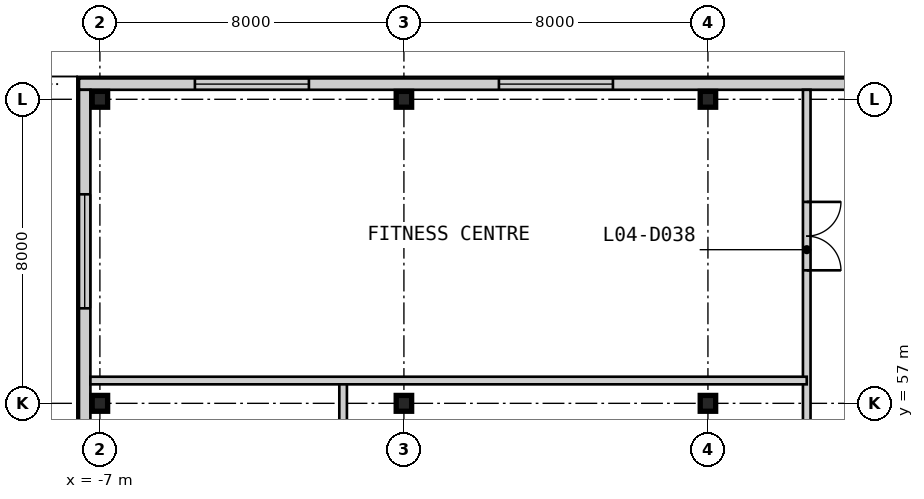
"""IFC4 building model, lengths in metres.
Left out: names, types, materials, properties, quantities, classifications, styles, units other than length and angle.
Written with IfcOpenShell. Run it as: python <this file> out.ifc"""

import sys

from ifc_helpers import new_model, si_unit, direction, frame, frame_2d, origin, origin_2d, place, context, subcontext, project, spatial, rectangle, i_section, extrude, element, fill, save


model = new_model("IFC4")
c1 = context("Model", 3, precision=1e-05, world=origin(), true_north=direction((0.0, 1.0)))
c2 = subcontext(c1, "Body", "Model", "MODEL_VIEW")
j1 = project(units=[si_unit("LENGTHUNIT", "METRE"), si_unit("PLANEANGLEUNIT", "RADIAN")], contexts=[c1])
p1 = place(None, origin())
s1 = spatial("IfcSite", under=j1, at=p1, CompositionType="ELEMENT")
p2 = place(p1, origin())
s2 = spatial("IfcBuilding", under=s1, at=p2, CompositionType="ELEMENT")
p3 = place(p2, frame((0.0, 0.0, 21.4)))
s3 = spatial("IfcBuildingStorey", under=s2, at=p3, CompositionType="ELEMENT", Elevation=21.4)
for number, where, z_axis, x_axis in (
    (1, (-7.0, 57.0, 0.0), (0.0, 0.0, 1.0), (1.0, 0.0, 0.0)),
    (2, (-7.0, 65.0, 0.0), (0.0, 0.0, 1.0), (1.0, 0.0, 0.0)),
    (3, (1.0, 57.0, 0.0), (0.0, 0.0, 1.0), (1.0, 0.0, 0.0)),
    (4, (1.0, 65.0, 0.0), (0.0, 0.0, 1.0), (1.0, 0.0, 0.0)),
    (5, (9.0, 57.0, 0.0), (0.0, 0.0, 1.0), (1.0, 0.0, 0.0)),
    (6, (9.0, 65.0, 0.0), (0.0, 0.0, 1.0), (1.0, 0.0, 0.0)),
):
    element("IfcColumn", number, at=place(p3, frame(where, z_axis=z_axis, x_axis=x_axis)), inside=s3, PredefinedType="COLUMN", context=c2, shape_type="SweptSolid", body=[
        extrude(i_section(OverallWidth=0.406, OverallDepth=0.417, WebThickness=0.03, FlangeThickness=0.048, at=origin_2d()), origin(), (0.0, 0.0, 1.0), 4.8),
    ])
p4 = place(p3, frame((57.55, 65.4, 0.0), z_axis=(0.0, 0.0, 1.0), x_axis=(-1.0, 0.0, 0.0)))
e7 = element("IfcWall", 7, at=p4, inside=s3, PredefinedType="SOLIDWALL", context=c2, shape_type="SweptSolid", body=[
    extrude(rectangle(XDim=65.1, YDim=0.3, at=frame_2d((32.55, 0.0))), origin(), (0.0, 0.0, 1.0), 4.5),
])
p5 = place(p4, frame((59.05, 0.0, 0.9)))
e8 = element("IfcOpeningElement", 8, at=p5, cuts=e7, PredefinedType="OPENING", context=c2, shape_type="SweptSolid", body=[
    extrude(rectangle(XDim=3.0, YDim=2.4, at=frame_2d((1.5, 1.2))), frame((0.0, 0.16, 0.0), z_axis=(0.0, -1.0, 0.0), x_axis=(1.0, 0.0, 0.0)), (0.0, 0.0, 1.0), 0.32),
])
p6 = place(p4, frame((51.05, 0.0, 0.9)))
e9 = element("IfcOpeningElement", 9, at=p6, cuts=e7, PredefinedType="OPENING", context=c2, shape_type="SweptSolid", body=[
    extrude(rectangle(XDim=3.0, YDim=2.4, at=frame_2d((1.5, 1.2))), frame((0.0, 0.16, 0.0), z_axis=(0.0, -1.0, 0.0), x_axis=(1.0, 0.0, 0.0)), (0.0, 0.0, 1.0), 0.32),
])
p7 = place(p4, frame((37.05, 0.0, 0.9)))
e10 = element("IfcOpeningElement", 10, at=p7, cuts=e7, PredefinedType="OPENING", context=c2, shape_type="SweptSolid", body=[
    extrude(rectangle(XDim=3.0, YDim=2.4, at=frame_2d((1.5, 1.2))), frame((0.0, 0.16, 0.0), z_axis=(0.0, -1.0, 0.0), x_axis=(1.0, 0.0, 0.0)), (0.0, 0.0, 1.0), 0.32),
])
p8 = place(p4, frame((25.05, 0.0, 0.9)))
e11 = element("IfcOpeningElement", 11, at=p8, cuts=e7, PredefinedType="OPENING", context=c2, shape_type="SweptSolid", body=[
    extrude(rectangle(XDim=3.0, YDim=2.4, at=frame_2d((1.5, 1.2))), frame((0.0, 0.16, 0.0), z_axis=(0.0, -1.0, 0.0), x_axis=(1.0, 0.0, 0.0)), (0.0, 0.0, 1.0), 0.32),
])
p9 = place(p4, frame((16.55, 0.0, 0.9)))
e12 = element("IfcOpeningElement", 12, at=p9, cuts=e7, PredefinedType="OPENING", context=c2, shape_type="SweptSolid", body=[
    extrude(rectangle(XDim=3.0, YDim=2.4, at=frame_2d((1.5, 1.2))), frame((0.0, 0.16, 0.0), z_axis=(0.0, -1.0, 0.0), x_axis=(1.0, 0.0, 0.0)), (0.0, 0.0, 1.0), 0.32),
])
p10 = place(p4, frame((10.55, 0.0, 0.9)))
e13 = element("IfcOpeningElement", 13, at=p10, cuts=e7, PredefinedType="OPENING", context=c2, shape_type="SweptSolid", body=[
    extrude(rectangle(XDim=3.0, YDim=2.4, at=frame_2d((1.5, 1.2))), frame((0.0, 0.16, 0.0), z_axis=(0.0, -1.0, 0.0), x_axis=(1.0, 0.0, 0.0)), (0.0, 0.0, 1.0), 0.32),
])
p11 = place(p4, frame((3.05, 0.0, 0.9)))
e14 = element("IfcOpeningElement", 14, at=p11, cuts=e7, PredefinedType="OPENING", context=c2, shape_type="SweptSolid", body=[
    extrude(rectangle(XDim=3.0, YDim=2.4, at=frame_2d((1.5, 1.2))), frame((0.0, 0.16, 0.0), z_axis=(0.0, -1.0, 0.0), x_axis=(1.0, 0.0, 0.0)), (0.0, 0.0, 1.0), 0.32),
])
p12 = place(p3, frame((-7.4, 65.25, 0.0), z_axis=(0.0, 0.0, 1.0), x_axis=(0.0, -1.0, 0.0)))
e15 = element("IfcWall", 15, at=p12, inside=s3, PredefinedType="SOLIDWALL", context=c2, shape_type="SweptSolid", body=[
    extrude(rectangle(XDim=72.5, YDim=0.3, at=frame_2d((36.25, 0.0))), origin(), (0.0, 0.0, 1.0), 4.5),
])
p13 = place(p12, frame((24.85, 0.0, 0.0)))
e16 = element("IfcOpeningElement", 16, at=p13, cuts=e15, PredefinedType="OPENING", context=c2, shape_type="SweptSolid", body=[
    extrude(rectangle(XDim=1.8, YDim=2.4, at=frame_2d((0.9, 1.2))), frame((0.0, 0.16, 0.0), z_axis=(0.0, -1.0, 0.0), x_axis=(1.0, 0.0, 0.0)), (0.0, 0.0, 1.0), 0.32),
])
p14 = place(p12, frame((59.85, 0.0, 0.0)))
e17 = element("IfcOpeningElement", 17, at=p14, cuts=e15, PredefinedType="OPENING", context=c2, shape_type="SweptSolid", body=[
    extrude(rectangle(XDim=1.8, YDim=2.4, at=frame_2d((0.9, 1.2))), frame((0.0, 0.16, 0.0), z_axis=(0.0, -1.0, 0.0), x_axis=(1.0, 0.0, 0.0)), (0.0, 0.0, 1.0), 0.32),
])
p15 = place(p12, frame((66.75, 0.0, 0.9)))
e18 = element("IfcOpeningElement", 18, at=p15, cuts=e15, PredefinedType="OPENING", context=c2, shape_type="SweptSolid", body=[
    extrude(rectangle(XDim=3.0, YDim=2.4, at=frame_2d((1.5, 1.2))), frame((0.0, 0.16, 0.0), z_axis=(0.0, -1.0, 0.0), x_axis=(1.0, 0.0, 0.0)), (0.0, 0.0, 1.0), 0.32),
])
p16 = place(p12, frame((44.75, 0.0, 0.9)))
e19 = element("IfcOpeningElement", 19, at=p16, cuts=e15, PredefinedType="OPENING", context=c2, shape_type="SweptSolid", body=[
    extrude(rectangle(XDim=3.0, YDim=2.4, at=frame_2d((1.5, 1.2))), frame((0.0, 0.16, 0.0), z_axis=(0.0, -1.0, 0.0), x_axis=(1.0, 0.0, 0.0)), (0.0, 0.0, 1.0), 0.32),
])
p17 = place(p12, frame((32.75, 0.0, 0.9)))
e20 = element("IfcOpeningElement", 20, at=p17, cuts=e15, PredefinedType="OPENING", context=c2, shape_type="SweptSolid", body=[
    extrude(rectangle(XDim=3.0, YDim=2.4, at=frame_2d((1.5, 1.2))), frame((0.0, 0.16, 0.0), z_axis=(0.0, -1.0, 0.0), x_axis=(1.0, 0.0, 0.0)), (0.0, 0.0, 1.0), 0.32),
])
p18 = place(p12, frame((18.25, 0.0, 0.9)))
e21 = element("IfcOpeningElement", 21, at=p18, cuts=e15, PredefinedType="OPENING", context=c2, shape_type="SweptSolid", body=[
    extrude(rectangle(XDim=3.0, YDim=2.4, at=frame_2d((1.5, 1.2))), frame((0.0, 0.16, 0.0), z_axis=(0.0, -1.0, 0.0), x_axis=(1.0, 0.0, 0.0)), (0.0, 0.0, 1.0), 0.32),
])
p19 = place(p12, frame((10.75, 0.0, 0.9)))
e22 = element("IfcOpeningElement", 22, at=p19, cuts=e15, PredefinedType="OPENING", context=c2, shape_type="SweptSolid", body=[
    extrude(rectangle(XDim=3.0, YDim=2.4, at=frame_2d((1.5, 1.2))), frame((0.0, 0.16, 0.0), z_axis=(0.0, -1.0, 0.0), x_axis=(1.0, 0.0, 0.0)), (0.0, 0.0, 1.0), 0.32),
])
p20 = place(p12, frame((2.75, 0.0, 0.9)))
e23 = element("IfcOpeningElement", 23, at=p20, cuts=e15, PredefinedType="OPENING", context=c2, shape_type="SweptSolid", body=[
    extrude(rectangle(XDim=3.0, YDim=2.4, at=frame_2d((1.5, 1.2))), frame((0.0, 0.16, 0.0), z_axis=(0.0, -1.0, 0.0), x_axis=(1.0, 0.0, 0.0)), (0.0, 0.0, 1.0), 0.32),
])
p21 = place(p3, frame((-0.6, 34.4, 0.0), z_axis=(0.0, 0.0, 1.0), x_axis=(0.0, 1.0, 0.0)))
e24 = element("IfcWall", 24, at=p21, inside=s3, PredefinedType="PARTITIONING", context=c2, shape_type="SweptSolid", body=[
    extrude(rectangle(XDim=23.2, YDim=0.2, at=frame_2d((11.6, 0.0))), origin(), (0.0, 0.0, 1.0), 4.5),
])
p22 = place(p3, frame((11.6, 43.0, 0.0), z_axis=(0.0, 0.0, 1.0), x_axis=(0.0, 1.0, 0.0)))
e25 = element("IfcWall", 25, at=p22, inside=s3, PredefinedType="PARTITIONING", context=c2, shape_type="SweptSolid", body=[
    extrude(rectangle(XDim=22.25, YDim=0.2, at=frame_2d((11.125, 0.0))), origin(), (0.0, 0.0, 1.0), 4.5),
])
p23 = place(p22, frame((7.175, 0.0, 0.0)))
e26 = element("IfcOpeningElement", 26, at=p23, cuts=e25, PredefinedType="OPENING", context=c2, shape_type="SweptSolid", body=[
    extrude(rectangle(XDim=1.8, YDim=2.4, at=frame_2d((0.9, 1.2))), frame((0.0, 0.11, 0.0), z_axis=(0.0, -1.0, 0.0), x_axis=(1.0, 0.0, 0.0)), (0.0, 0.0, 1.0), 0.22),
])
p24 = place(p22, frame((17.5, 0.0, 0.0)))
e27 = element("IfcOpeningElement", 27, at=p24, cuts=e25, PredefinedType="OPENING", context=c2, shape_type="SweptSolid", body=[
    extrude(rectangle(XDim=1.8, YDim=2.4, at=frame_2d((0.9, 1.2))), frame((0.0, 0.11, 0.0), z_axis=(0.0, -1.0, 0.0), x_axis=(1.0, 0.0, 0.0)), (0.0, 0.0, 1.0), 0.22),
])
p25 = place(p3, frame((-7.25, 57.6, 0.0), z_axis=(0.0, 0.0, 1.0), x_axis=(1.0, 0.0, 0.0)))
e28 = element("IfcWall", 28, at=p25, inside=s3, PredefinedType="PARTITIONING", context=c2, shape_type="SweptSolid", body=[
    extrude(rectangle(XDim=18.85, YDim=0.2, at=frame_2d((9.425, 0.0))), origin(), (0.0, 0.0, 1.0), 4.5),
])
p26 = place(p5, origin())
e29 = element("IfcWindow", 29, at=p26, inside=s3, PartitioningType="SINGLE_PANEL", PredefinedType="WINDOW", context=c2, shape_type="SweptSolid", body=[
    extrude(rectangle(XDim=3.0, YDim=2.4, at=frame_2d((1.5, 1.2))), frame((0.0, 0.03, 0.0), z_axis=(0.0, -1.0, 0.0), x_axis=(1.0, 0.0, 0.0)), (0.0, 0.0, 1.0), 0.06),
])
fill(e8, e29)
p27 = place(p6, origin())
e30 = element("IfcWindow", 30, at=p27, inside=s3, PartitioningType="SINGLE_PANEL", PredefinedType="WINDOW", context=c2, shape_type="SweptSolid", body=[
    extrude(rectangle(XDim=3.0, YDim=2.4, at=frame_2d((1.5, 1.2))), frame((0.0, 0.03, 0.0), z_axis=(0.0, -1.0, 0.0), x_axis=(1.0, 0.0, 0.0)), (0.0, 0.0, 1.0), 0.06),
])
fill(e9, e30)
p28 = place(p20, origin())
e31 = element("IfcWindow", 31, at=p28, inside=s3, PartitioningType="SINGLE_PANEL", PredefinedType="WINDOW", context=c2, shape_type="SweptSolid", body=[
    extrude(rectangle(XDim=3.0, YDim=2.4, at=frame_2d((1.5, 1.2))), frame((0.0, 0.03, 0.0), z_axis=(0.0, -1.0, 0.0), x_axis=(1.0, 0.0, 0.0)), (0.0, 0.0, 1.0), 0.06),
])
fill(e23, e31)
p29 = place(p24, frame((1.8, 0.0, 0.0), z_axis=(0.0, 0.0, 1.0), x_axis=(-1.0, 0.0, 0.0)))
e32 = element("IfcDoor", 32, at=p29, inside=s3, OperationType="DOUBLE_DOOR_SINGLE_SWING", PredefinedType="DOOR", context=c2, shape_type="SweptSolid", body=[
    extrude(rectangle(XDim=1.8, YDim=2.4, at=frame_2d((0.9, 1.2))), frame((0.0, 0.025, 0.0), z_axis=(0.0, -1.0, 0.0), x_axis=(1.0, 0.0, 0.0)), (0.0, 0.0, 1.0), 0.05),
])
fill(e27, e32)
save(model, sys.argv[1])
